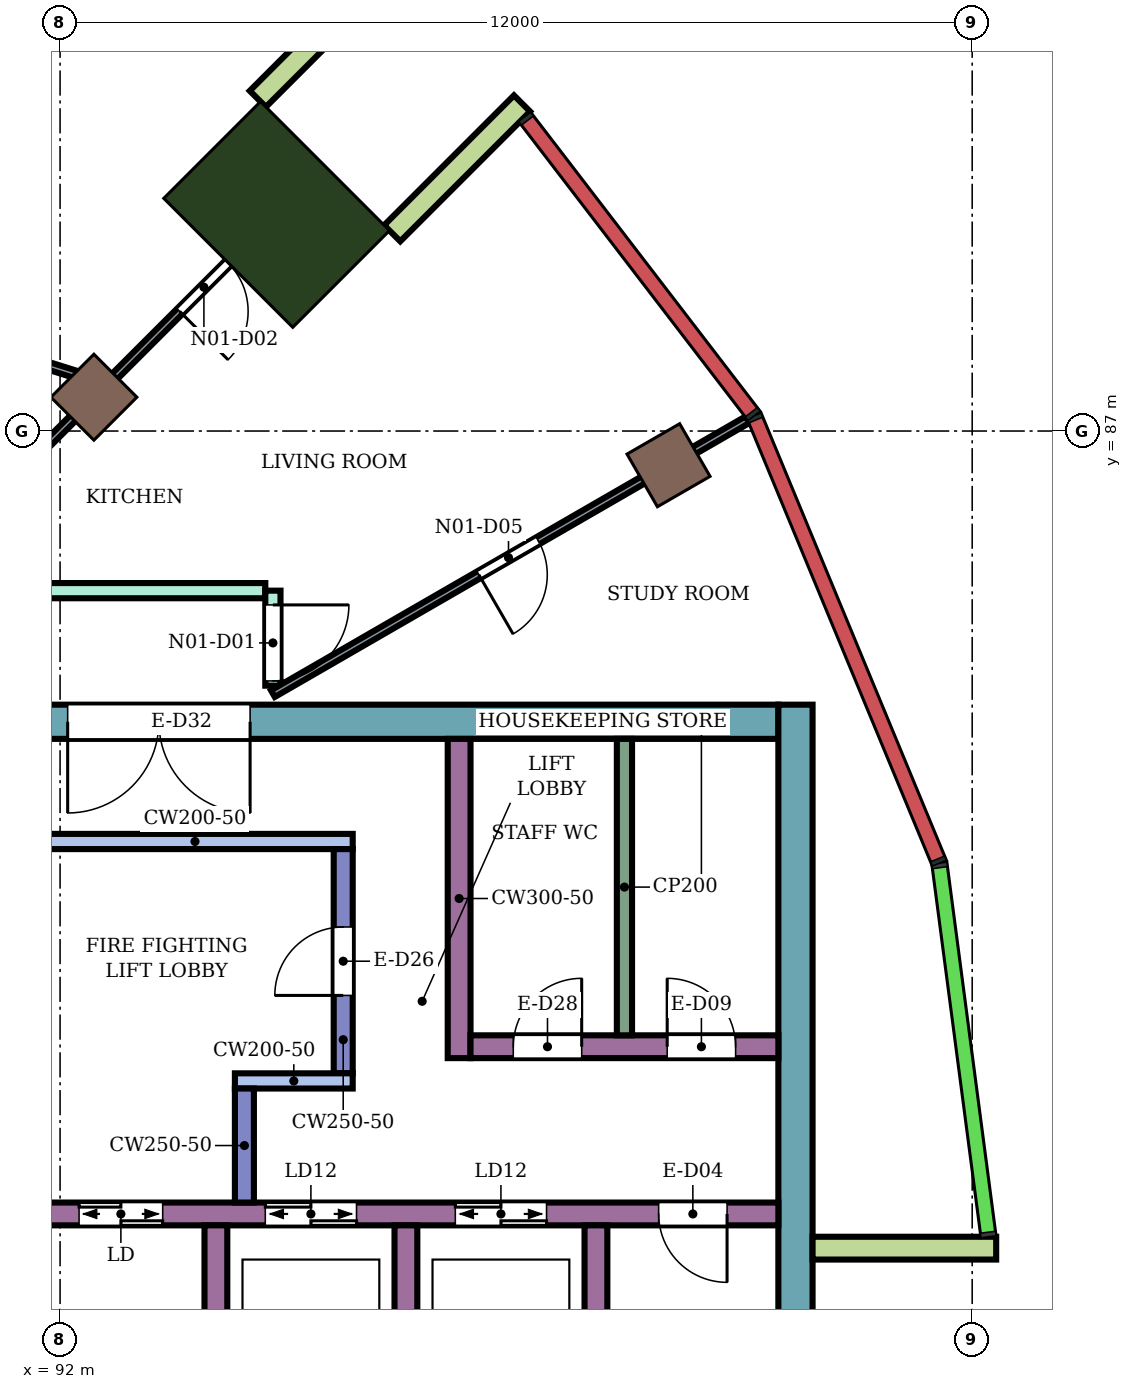
"""IFC4 building model, lengths in metres.
Left out: names, types, materials, properties, quantities, classifications, styles, units other than length and angle.
Written with IfcOpenShell. Run it as: python <this file> out.ifc"""

import sys

from ifc_helpers import new_model, si_unit, direction, frame, frame_2d, origin, origin_2d, place, context, subcontext, project, spatial, rectangle, extrude, element, fill, save


model = new_model("IFC4")
c1 = context("Model", 3, precision=1e-05, world=origin(), true_north=direction((0.0, 1.0)))
c2 = subcontext(c1, "Body", "Model", "MODEL_VIEW")
j1 = project(units=[si_unit("LENGTHUNIT", "METRE"), si_unit("PLANEANGLEUNIT", "RADIAN")], contexts=[c1])
p1 = place(None, origin())
s1 = spatial("IfcSite", under=j1, at=p1, CompositionType="ELEMENT")
p2 = place(p1, origin())
s2 = spatial("IfcBuilding", under=s1, at=p2, CompositionType="ELEMENT")
p3 = place(p2, frame((0.0, 0.0, 279.9)))
s3 = spatial("IfcBuildingStorey", under=s2, at=p3, CompositionType="ELEMENT", Elevation=279.9)
for number, where, z_axis, x_axis in (
    (1, (100.005, 86.55, 0.0), (0.0, 0.0, 1.0), (0.866, 0.5, 0.0)),
    (2, (92.445, 87.445, 0.0), (0.0, 0.0, 1.0), (0.707, 0.707, 0.0)),
):
    element("IfcColumn", number, at=place(p3, frame(where, z_axis=z_axis, x_axis=x_axis)), inside=s3, PredefinedType="COLUMN", context=c2, shape_type="SweptSolid", body=[
        extrude(rectangle(XDim=0.8, YDim=0.8, at=origin_2d()), origin(), (0.0, 0.0, 1.0), 4.2),
    ])
p4 = place(p3, frame((94.849, 89.849, 0.0), z_axis=(0.0, 0.0, 1.0), x_axis=(0.707106781187, 0.707106781187, 0.0)))
e3 = element("IfcColumn", 3, at=p4, inside=s3, PredefinedType="COLUMN", context=c2, shape_type="SweptSolid", body=[
    extrude(rectangle(XDim=1.8, YDim=2.4, at=origin_2d()), origin(), (0.0, 0.0, 1.0), 4.2),
])
p5 = place(p3, frame((87.9, 83.175, 0.0), z_axis=(0.0, 0.0, 1.0), x_axis=(1.0, 0.0, 0.0)))
e4 = element("IfcWall", 4, at=p5, inside=s3, PredefinedType="SHEAR", context=c2, shape_type="SweptSolid", body=[
    extrude(rectangle(XDim=13.55, YDim=0.45, at=frame_2d((6.775, 0.0))), origin(), (0.0, 0.0, 1.0), 3.88),
])
p6 = place(p5, frame((4.2, 0.0, 0.0)))
e5 = element("IfcOpeningElement", 5, at=p6, cuts=e4, PredefinedType="OPENING", context=c2, shape_type="SweptSolid", body=[
    extrude(rectangle(XDim=2.4, YDim=2.4, at=frame_2d((1.2, 1.2))), frame((0.0, 0.235, 0.0), z_axis=(0.0, -1.0, 0.0), x_axis=(1.0, 0.0, 0.0)), (0.0, 0.0, 1.0), 0.47),
])
p7 = place(p3, frame((101.675, 66.6, 0.0), z_axis=(0.0, 0.0, 1.0), x_axis=(0.0, 1.0, 0.0)))
e6 = element("IfcWall", 6, at=p7, inside=s3, PredefinedType="SHEAR", context=c2, shape_type="SweptSolid", body=[
    extrude(rectangle(XDim=16.8, YDim=0.45, at=frame_2d((8.4, 0.0))), origin(), (0.0, 0.0, 1.0), 3.88),
])
p8 = place(p3, frame((91.7, 76.7, 0.0), z_axis=(0.0, 0.0, 1.0), x_axis=(1.0, 0.0, 0.0)))
e7 = element("IfcWall", 7, at=p8, inside=s3, PredefinedType="SHEAR", context=c2, shape_type="SweptSolid", body=[
    extrude(rectangle(XDim=9.75, YDim=0.3, at=frame_2d((4.875, 0.0))), origin(), (0.0, 0.0, 1.0), 3.88),
])
p9 = place(p8, frame((0.55, 0.0, 0.0)))
e8 = element("IfcOpeningElement", 8, at=p9, cuts=e7, PredefinedType="OPENING", context=c2, shape_type="SweptSolid", body=[
    extrude(rectangle(XDim=1.1, YDim=2.1, at=frame_2d((0.55, 1.05))), frame((0.0, 0.16, 0.0), z_axis=(0.0, -1.0, 0.0), x_axis=(1.0, 0.0, 0.0)), (0.0, 0.0, 1.0), 0.32),
])
p10 = place(p8, frame((3.0, 0.0, 0.0)))
e9 = element("IfcOpeningElement", 9, at=p10, cuts=e7, PredefinedType="OPENING", context=c2, shape_type="SweptSolid", body=[
    extrude(rectangle(XDim=1.2, YDim=2.1, at=frame_2d((0.6, 1.05))), frame((0.0, 0.16, 0.0), z_axis=(0.0, -1.0, 0.0), x_axis=(1.0, 0.0, 0.0)), (0.0, 0.0, 1.0), 0.32),
])
p11 = place(p8, frame((5.5, 0.0, 0.0)))
e10 = element("IfcOpeningElement", 10, at=p11, cuts=e7, PredefinedType="OPENING", context=c2, shape_type="SweptSolid", body=[
    extrude(rectangle(XDim=1.2, YDim=2.1, at=frame_2d((0.6, 1.05))), frame((0.0, 0.16, 0.0), z_axis=(0.0, -1.0, 0.0), x_axis=(1.0, 0.0, 0.0)), (0.0, 0.0, 1.0), 0.32),
])
p12 = place(p8, frame((8.175, 0.0, 0.0)))
e11 = element("IfcOpeningElement", 11, at=p12, cuts=e7, PredefinedType="OPENING", context=c2, shape_type="SweptSolid", body=[
    extrude(rectangle(XDim=0.9, YDim=2.1, at=frame_2d((0.45, 1.05))), frame((0.0, 0.16, 0.0), z_axis=(0.0, -1.0, 0.0), x_axis=(1.0, 0.0, 0.0)), (0.0, 0.0, 1.0), 0.32),
])
for number, where, z_axis, x_axis in (
    (12, (94.05, 74.0, 0.0), (0.0, 0.0, 1.0), (0.0, 1.0, 0.0)),
    (13, (96.55, 74.0, 0.0), (0.0, 0.0, 1.0), (0.0, 1.0, 0.0)),
    (14, (99.05, 74.0, 0.0), (0.0, 0.0, 1.0), (0.0, 1.0, 0.0)),
):
    element("IfcWall", number, at=place(p3, frame(where, z_axis=z_axis, x_axis=x_axis)), inside=s3, PredefinedType="SHEAR", context=c2, shape_type="SweptSolid", body=[
        extrude(rectangle(XDim=2.55, YDim=0.3, at=frame_2d((1.275, 0.0))), origin(), (0.0, 0.0, 1.0), 3.88),
    ])
p13 = place(p3, frame((91.7, 81.6, 0.0), z_axis=(0.0, 0.0, 1.0), x_axis=(1.0, 0.0, 0.0)))
e15 = element("IfcWall", 15, at=p13, inside=s3, PredefinedType="SHEAR", context=c2, shape_type="SweptSolid", body=[
    extrude(rectangle(XDim=4.15, YDim=0.2, at=frame_2d((2.075, 0.0))), origin(), (0.0, 0.0, 1.0), 3.88),
])
p14 = place(p3, frame((95.725, 78.55, 0.0), z_axis=(0.0, 0.0, 1.0), x_axis=(0.0, 1.0, 0.0)))
e16 = element("IfcWall", 16, at=p14, inside=s3, PredefinedType="SHEAR", context=c2, shape_type="SweptSolid", body=[
    extrude(rectangle(XDim=2.95, YDim=0.25, at=frame_2d((1.475, 0.0))), origin(), (0.0, 0.0, 1.0), 3.88),
])
p15 = place(p14, frame((1.025, 0.0, 0.0)))
e17 = element("IfcOpeningElement", 17, at=p15, cuts=e16, PredefinedType="OPENING", context=c2, shape_type="SweptSolid", body=[
    extrude(rectangle(XDim=0.9, YDim=2.1, at=frame_2d((0.45, 1.05))), frame((0.0, 0.135, 0.0), z_axis=(0.0, -1.0, 0.0), x_axis=(1.0, 0.0, 0.0)), (0.0, 0.0, 1.0), 0.27),
])
p16 = place(p3, frame((94.3, 78.45, 0.0), z_axis=(0.0, 0.0, 1.0), x_axis=(1.0, 0.0, 0.0)))
e18 = element("IfcWall", 18, at=p16, inside=s3, PredefinedType="SHEAR", context=c2, shape_type="SweptSolid", body=[
    extrude(rectangle(XDim=1.55, YDim=0.2, at=frame_2d((0.775, 0.0))), origin(), (0.0, 0.0, 1.0), 3.88),
])
p17 = place(p3, frame((94.425, 76.85, 0.0), z_axis=(0.0, 0.0, 1.0), x_axis=(0.0, 1.0, 0.0)))
e19 = element("IfcWall", 19, at=p17, inside=s3, PredefinedType="SHEAR", context=c2, shape_type="SweptSolid", body=[
    extrude(rectangle(XDim=1.5, YDim=0.25, at=frame_2d((0.75, 0.0))), origin(), (0.0, 0.0, 1.0), 3.88),
])
p18 = place(p3, frame((97.25, 78.75, 0.0), z_axis=(0.0, 0.0, 1.0), x_axis=(0.0, 1.0, 0.0)))
e20 = element("IfcWall", 20, at=p18, inside=s3, PredefinedType="SHEAR", context=c2, shape_type="SweptSolid", body=[
    extrude(rectangle(XDim=4.2, YDim=0.3, at=frame_2d((2.1, 0.0))), origin(), (0.0, 0.0, 1.0), 3.88),
])
p19 = place(p3, frame((97.4, 78.9, 0.0), z_axis=(0.0, 0.0, 1.0), x_axis=(1.0, 0.0, 0.0)))
e21 = element("IfcWall", 21, at=p19, inside=s3, PredefinedType="SHEAR", context=c2, shape_type="SweptSolid", body=[
    extrude(rectangle(XDim=4.05, YDim=0.3, at=frame_2d((2.025, 0.0))), origin(), (0.0, 0.0, 1.0), 3.88),
])
p20 = place(p19, frame((0.562, 0.0, 0.0)))
e22 = element("IfcOpeningElement", 22, at=p20, cuts=e21, PredefinedType="OPENING", context=c2, shape_type="SweptSolid", body=[
    extrude(rectangle(XDim=0.9, YDim=2.1, at=frame_2d((0.45, 1.05))), frame((0.0, 0.16, 0.0), z_axis=(0.0, -1.0, 0.0), x_axis=(1.0, 0.0, 0.0)), (0.0, 0.0, 1.0), 0.32),
])
p21 = place(p19, frame((2.587, 0.0, 0.0)))
e23 = element("IfcOpeningElement", 23, at=p21, cuts=e21, PredefinedType="OPENING", context=c2, shape_type="SweptSolid", body=[
    extrude(rectangle(XDim=0.9, YDim=2.1, at=frame_2d((0.45, 1.05))), frame((0.0, 0.16, 0.0), z_axis=(0.0, -1.0, 0.0), x_axis=(1.0, 0.0, 0.0)), (0.0, 0.0, 1.0), 0.32),
])
p22 = place(p3, frame((101.9, 76.25, 0.0), z_axis=(0.0, 0.0, 1.0), x_axis=(1.0, 0.0, 0.0)))
e24 = element("IfcWall", 24, at=p22, inside=s3, PredefinedType="NOTDEFINED", context=c2, shape_type="SweptSolid", body=[
    extrude(rectangle(XDim=2.416, YDim=0.3, at=frame_2d((1.208, 0.0))), origin(), (0.0, 0.0, 1.0), 4.2),
])
for number, where, z_axis, x_axis in (
    (25, (96.37, 89.602, 0.0), (0.0, 0.0, 1.0), (0.707, 0.707, 0.0)),
    (26, (94.602, 91.37, 0.0), (0.0, 0.0, 1.0), (0.707, 0.707, 0.0)),
):
    element("IfcWall", number, at=place(p3, frame(where, z_axis=z_axis, x_axis=x_axis)), inside=s3, PredefinedType="NOTDEFINED", context=c2, shape_type="SweptSolid", body=[
        extrude(rectangle(XDim=2.416, YDim=0.3, at=frame_2d((1.208, 0.0))), origin(), (0.0, 0.0, 1.0), 4.2),
    ])
p23 = place(p3, frame((86.678, 86.562, 0.0), z_axis=(0.0, 0.0, 1.0), x_axis=(0.500133037155, 0.865948581122, 0.0)))
e27 = element("IfcWall", 27, at=p23, inside=s3, PredefinedType="PARTITIONING", context=c2, shape_type="SweptSolid", body=[
    extrude(rectangle(XDim=10.946, YDim=0.2, at=frame_2d((5.473, 0.0))), origin(), (0.0, 0.0, 1.0), 3.75),
])
p24 = place(p3, frame((91.8, 84.9, 0.0), z_axis=(0.0, 0.0, 1.0), x_axis=(1.0, 0.0, 0.0)))
e28 = element("IfcWall", 28, at=p24, inside=s3, PredefinedType="PARTITIONING", context=c2, shape_type="SweptSolid", body=[
    extrude(rectangle(XDim=2.9, YDim=0.2, at=frame_2d((1.45, 0.0))), origin(), (0.0, 0.0, 1.0), 3.75),
])
p25 = place(p3, frame((94.8, 83.65, 0.0), z_axis=(0.0, 0.0, 1.0), x_axis=(0.0, 1.0, 0.0)))
e29 = element("IfcWall", 29, at=p25, inside=s3, PredefinedType="PARTITIONING", context=c2, shape_type="SweptSolid", body=[
    extrude(rectangle(XDim=1.25, YDim=0.2, at=frame_2d((0.625, 0.0))), origin(), (0.0, 0.0, 1.0), 3.75),
])
p26 = place(p25, frame((0.062, 0.0, 0.0)))
e30 = element("IfcOpeningElement", 30, at=p26, cuts=e29, PredefinedType="OPENING", context=c2, shape_type="SweptSolid", body=[
    extrude(rectangle(XDim=1.0, YDim=2.1, at=frame_2d((0.5, 1.05))), frame((0.0, 0.11, 0.0), z_axis=(0.0, -1.0, 0.0), x_axis=(1.0, 0.0, 0.0)), (0.0, 0.0, 1.0), 0.22),
])
p27 = place(p3, frame((88.207, 88.999, 0.0), z_axis=(0.0, 0.0, 1.0), x_axis=(0.954166656768, -0.29927577769, 0.0)))
e31 = element("IfcWall", 31, at=p27, inside=s3, PredefinedType="PARTITIONING", context=c2, shape_type="SweptSolid", body=[
    extrude(rectangle(XDim=4.542, YDim=0.1, at=frame_2d((2.271, 0.0))), origin(), (0.0, 0.0, 1.0), 3.75),
])
p28 = place(p27, frame((0.592, 0.0, 0.0)))
e32 = element("IfcOpeningElement", 32, at=p28, cuts=e31, PredefinedType="OPENING", context=c2, shape_type="SweptSolid", body=[
    extrude(rectangle(XDim=0.8, YDim=2.1, at=frame_2d((0.4, 1.05))), frame((0.0, 0.06, 0.0), z_axis=(0.0, -1.0, 0.0), x_axis=(1.0, 0.0, 0.0)), (0.0, 0.0, 1.0), 0.12),
])
p29 = place(p27, frame((2.732, 0.0, 0.0)))
e33 = element("IfcOpeningElement", 33, at=p29, cuts=e31, PredefinedType="OPENING", context=c2, shape_type="SweptSolid", body=[
    extrude(rectangle(XDim=0.8, YDim=2.1, at=frame_2d((0.4, 1.05))), frame((0.0, 0.06, 0.0), z_axis=(0.0, -1.0, 0.0), x_axis=(1.0, 0.0, 0.0)), (0.0, 0.0, 1.0), 0.12),
])
p30 = place(p3, frame((90.395, 85.395, 0.0), z_axis=(0.0, 0.0, 1.0), x_axis=(0.707106781187, 0.707106781187, 0.0)))
e34 = element("IfcWall", 34, at=p30, inside=s3, PredefinedType="PARTITIONING", context=c2, shape_type="SweptSolid", body=[
    extrude(rectangle(XDim=7.0, YDim=0.1, at=frame_2d((3.5, 0.0))), origin(), (0.0, 0.0, 1.0), 3.75),
])
p31 = place(p30, frame((4.496, 0.0, 0.0)))
e35 = element("IfcOpeningElement", 35, at=p31, cuts=e34, PredefinedType="OPENING", context=c2, shape_type="SweptSolid", body=[
    extrude(rectangle(XDim=0.9, YDim=2.1, at=frame_2d((0.45, 1.05))), frame((0.0, 0.06, 0.0), z_axis=(0.0, -1.0, 0.0), x_axis=(1.0, 0.0, 0.0)), (0.0, 0.0, 1.0), 0.12),
])
p32 = place(p3, frame((94.8, 83.545, 0.0), z_axis=(0.0, 0.0, 1.0), x_axis=(0.866044015472, 0.499967762227, 0.0)))
e36 = element("IfcWall", 36, at=p32, inside=s3, PredefinedType="PARTITIONING", context=c2, shape_type="SweptSolid", body=[
    extrude(rectangle(XDim=7.208, YDim=0.1, at=frame_2d((3.604, 0.0))), origin(), (0.0, 0.0, 1.0), 3.75),
])
p33 = place(p32, frame((3.129, 0.0, 0.0)))
e37 = element("IfcOpeningElement", 37, at=p33, cuts=e36, PredefinedType="OPENING", context=c2, shape_type="SweptSolid", body=[
    extrude(rectangle(XDim=0.9, YDim=2.1, at=frame_2d((0.45, 1.05))), frame((0.0, 0.06, 0.0), z_axis=(0.0, -1.0, 0.0), x_axis=(1.0, 0.0, 0.0)), (0.0, 0.0, 1.0), 0.12),
])
p34 = place(p3, frame((99.425, 79.05, 0.0), z_axis=(0.0, 0.0, 1.0), x_axis=(0.0, 1.0, 0.0)))
e38 = element("IfcWall", 38, at=p34, inside=s3, PredefinedType="PARTITIONING", context=c2, shape_type="SweptSolid", body=[
    extrude(rectangle(XDim=3.9, YDim=0.2, at=frame_2d((1.95, 0.0))), origin(), (0.0, 0.0, 1.0), 3.88),
])
p35 = place(p26, frame((1.0, 0.0, 0.0), z_axis=(0.0, 0.0, 1.0), x_axis=(-1.0, 0.0, 0.0)))
e39 = element("IfcDoor", 39, at=p35, inside=s3, OperationType="SINGLE_SWING_LEFT", PredefinedType="DOOR", context=c2, shape_type="SweptSolid", body=[
    extrude(rectangle(XDim=1.0, YDim=2.1, at=frame_2d((0.5, 1.05))), frame((0.0, 0.025, 0.0), z_axis=(0.0, -1.0, 0.0), x_axis=(1.0, 0.0, 0.0)), (0.0, 0.0, 1.0), 0.05),
])
fill(e30, e39)
p36 = place(p31, frame((0.9, 0.0, 0.0), z_axis=(0.0, 0.0, 1.0), x_axis=(-1.0, 0.0, 0.0)))
e40 = element("IfcDoor", 40, at=p36, inside=s3, OperationType="SINGLE_SWING_RIGHT", PredefinedType="DOOR", context=c2, shape_type="SweptSolid", body=[
    extrude(rectangle(XDim=0.9, YDim=2.1, at=frame_2d((0.45, 1.05))), frame((0.0, 0.025, 0.0), z_axis=(0.0, -1.0, 0.0), x_axis=(1.0, 0.0, 0.0)), (0.0, 0.0, 1.0), 0.05),
])
fill(e35, e40)
p37 = place(p33, frame((0.9, 0.0, 0.0), z_axis=(0.0, 0.0, 1.0), x_axis=(-1.0, 0.0, 0.0)))
e41 = element("IfcDoor", 41, at=p37, inside=s3, OperationType="SINGLE_SWING_RIGHT", PredefinedType="DOOR", context=c2, shape_type="SweptSolid", body=[
    extrude(rectangle(XDim=0.9, YDim=2.1, at=frame_2d((0.45, 1.05))), frame((0.0, 0.025, 0.0), z_axis=(0.0, -1.0, 0.0), x_axis=(1.0, 0.0, 0.0)), (0.0, 0.0, 1.0), 0.05),
])
fill(e37, e41)
p38 = place(p9, origin())
e42 = element("IfcDoor", 42, at=p38, inside=s3, OperationType="DOUBLE_DOOR_SLIDING", PredefinedType="DOOR", context=c2, shape_type="SweptSolid", body=[
    extrude(rectangle(XDim=1.1, YDim=2.1, at=frame_2d((0.55, 1.05))), frame((0.0, 0.025, 0.0), z_axis=(0.0, -1.0, 0.0), x_axis=(1.0, 0.0, 0.0)), (0.0, 0.0, 1.0), 0.05),
])
fill(e8, e42)
p39 = place(p10, origin())
e43 = element("IfcDoor", 43, at=p39, inside=s3, OperationType="DOUBLE_DOOR_SLIDING", PredefinedType="DOOR", context=c2, shape_type="SweptSolid", body=[
    extrude(rectangle(XDim=1.2, YDim=2.1, at=frame_2d((0.6, 1.05))), frame((0.0, 0.025, 0.0), z_axis=(0.0, -1.0, 0.0), x_axis=(1.0, 0.0, 0.0)), (0.0, 0.0, 1.0), 0.05),
])
fill(e9, e43)
p40 = place(p11, origin())
e44 = element("IfcDoor", 44, at=p40, inside=s3, OperationType="DOUBLE_DOOR_SLIDING", PredefinedType="DOOR", context=c2, shape_type="SweptSolid", body=[
    extrude(rectangle(XDim=1.2, YDim=2.1, at=frame_2d((0.6, 1.05))), frame((0.0, 0.025, 0.0), z_axis=(0.0, -1.0, 0.0), x_axis=(1.0, 0.0, 0.0)), (0.0, 0.0, 1.0), 0.05),
])
fill(e10, e44)
p41 = place(p12, frame((0.9, 0.0, 0.0), z_axis=(0.0, 0.0, 1.0), x_axis=(-1.0, 0.0, 0.0)))
e45 = element("IfcDoor", 45, at=p41, inside=s3, OperationType="SINGLE_SWING_LEFT", PredefinedType="DOOR", context=c2, shape_type="SweptSolid", body=[
    extrude(rectangle(XDim=0.9, YDim=2.1, at=frame_2d((0.45, 1.05))), frame((0.0, 0.025, 0.0), z_axis=(0.0, -1.0, 0.0), x_axis=(1.0, 0.0, 0.0)), (0.0, 0.0, 1.0), 0.05),
])
fill(e11, e45)
p42 = place(p15, origin())
e46 = element("IfcDoor", 46, at=p42, inside=s3, OperationType="SINGLE_SWING_LEFT", PredefinedType="DOOR", context=c2, shape_type="SweptSolid", body=[
    extrude(rectangle(XDim=0.9, YDim=2.1, at=frame_2d((0.45, 1.05))), frame((0.0, 0.025, 0.0), z_axis=(0.0, -1.0, 0.0), x_axis=(1.0, 0.0, 0.0)), (0.0, 0.0, 1.0), 0.05),
])
fill(e17, e46)
p43 = place(p20, origin())
e47 = element("IfcDoor", 47, at=p43, inside=s3, OperationType="SINGLE_SWING_RIGHT", PredefinedType="DOOR", context=c2, shape_type="SweptSolid", body=[
    extrude(rectangle(XDim=0.9, YDim=2.1, at=frame_2d((0.45, 1.05))), frame((0.0, 0.025, 0.0), z_axis=(0.0, -1.0, 0.0), x_axis=(1.0, 0.0, 0.0)), (0.0, 0.0, 1.0), 0.05),
])
fill(e22, e47)
p44 = place(p21, origin())
e48 = element("IfcDoor", 48, at=p44, inside=s3, OperationType="SINGLE_SWING_LEFT", PredefinedType="DOOR", context=c2, shape_type="SweptSolid", body=[
    extrude(rectangle(XDim=0.9, YDim=2.1, at=frame_2d((0.45, 1.05))), frame((0.0, 0.025, 0.0), z_axis=(0.0, -1.0, 0.0), x_axis=(1.0, 0.0, 0.0)), (0.0, 0.0, 1.0), 0.05),
])
fill(e23, e48)
p45 = place(p6, frame((2.4, 0.0, 0.0), z_axis=(0.0, 0.0, 1.0), x_axis=(-1.0, 0.0, 0.0)))
e49 = element("IfcDoor", 49, at=p45, inside=s3, OperationType="DOUBLE_DOOR_SINGLE_SWING", PredefinedType="DOOR", context=c2, shape_type="SweptSolid", body=[
    extrude(rectangle(XDim=2.4, YDim=2.4, at=frame_2d((1.2, 1.2))), frame((0.0, 0.025, 0.0), z_axis=(0.0, -1.0, 0.0), x_axis=(1.0, 0.0, 0.0)), (0.0, 0.0, 1.0), 0.05),
])
fill(e5, e49)
save(model, sys.argv[1])
